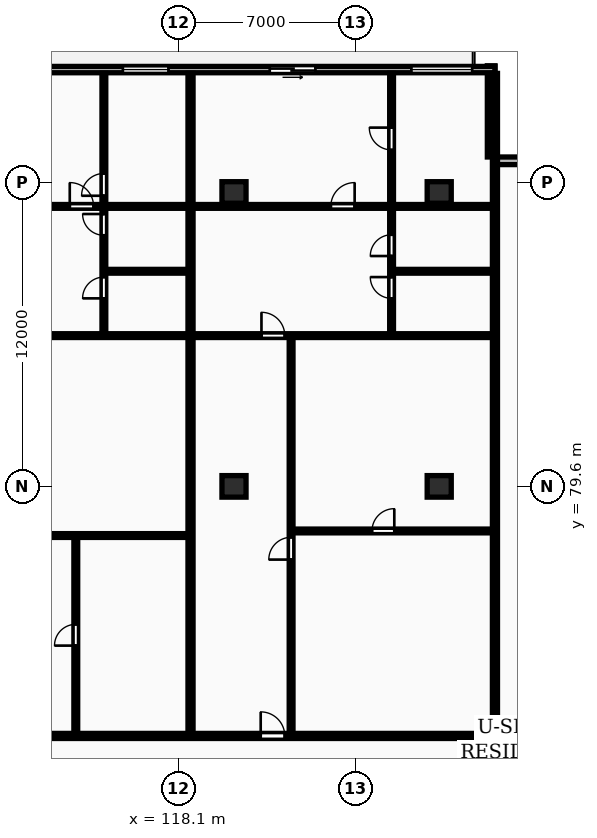
"""IFC4 building model, lengths in metres.
Left out: names, types, materials, properties, quantities, classifications, styles, units other than length and angle.
Written with IfcOpenShell. Run it as: python <this file> out.ifc"""

import sys

from ifc_helpers import new_model, si_unit, direction, frame, frame_2d, origin, origin_2d, place, context, subcontext, project, spatial, rectangle, extrude, element, fill, save


model = new_model("IFC4")
c1 = context("Model", 3, precision=1e-05, world=origin(), true_north=direction((0.0, 1.0)))
c2 = subcontext(c1, "Body", "Model", "MODEL_VIEW")
j1 = project(units=[si_unit("LENGTHUNIT", "METRE"), si_unit("PLANEANGLEUNIT", "RADIAN")], contexts=[c1])
p1 = place(None, origin())
s1 = spatial("IfcSite", under=j1, at=p1, CompositionType="ELEMENT")
p2 = place(p1, origin())
s2 = spatial("IfcBuilding", under=s1, at=p2, CompositionType="ELEMENT")
p3 = place(p2, frame((0.0, 0.0, 113.3)))
s3 = spatial("IfcBuildingStorey", under=s2, at=p3, CompositionType="ELEMENT", Elevation=113.3)
for number, where, z_axis, x_axis in (
    (1, (120.3, 79.6, 0.0), (0.0, 0.0, 1.0), (1.0, 0.0, 0.0)),
    (2, (120.3, 91.2, 0.0), (0.0, 0.0, 1.0), (1.0, 0.0, 0.0)),
    (3, (128.4, 79.6, 0.0), (0.0, 0.0, 1.0), (1.0, 0.0, 0.0)),
    (4, (128.4, 91.2, 0.0), (0.0, 0.0, 1.0), (1.0, 0.0, 0.0)),
):
    element("IfcColumn", number, at=place(p3, frame(where, z_axis=z_axis, x_axis=x_axis)), inside=s3, PredefinedType="COLUMN", context=c2, shape_type="SweptSolid", body=[
        extrude(rectangle(XDim=0.95, YDim=0.85, at=origin_2d()), origin(), (0.0, 0.0, 1.0), 3.25),
    ])
for number, where, z_axis, x_axis in (
    (5, (134.2, 92.45, 0.0), (0.0, 0.0, 1.0), (-1.0, 0.0, 0.0)),
    (6, (130.45, 92.6, 0.0), (0.0, 0.0, 1.0), (0.0, 1.0, 0.0)),
):
    element("IfcWall", number, at=place(p3, frame(where, z_axis=z_axis, x_axis=x_axis)), inside=s3, PredefinedType="STANDARD", context=c2, shape_type="SweptSolid", body=[
        extrude(rectangle(XDim=3.6, YDim=0.3, at=frame_2d((1.8, 0.0))), origin(), (0.0, 0.0, 1.0), 2.97),
    ])
p4 = place(p3, frame((130.6, 96.05, 0.0), z_axis=(0.0, 0.0, 1.0), x_axis=(-1.0, 0.0, 0.0)))
e7 = element("IfcWall", 7, at=p4, inside=s3, PredefinedType="STANDARD", context=c2, shape_type="SweptSolid", body=[
    extrude(rectangle(XDim=73.0, YDim=0.25, at=frame_2d((36.5, 0.0))), origin(), (0.0, 0.0, 1.0), 2.97),
])
p5 = place(p4, frame((68.319, 0.0, 0.0)))
e8 = element("IfcOpeningElement", 8, at=p5, cuts=e7, PredefinedType="OPENING", context=c2, shape_type="SweptSolid", body=[
    extrude(rectangle(XDim=1.8, YDim=2.2, at=frame_2d((0.9, 1.1))), frame((0.0, 0.135, 0.0), z_axis=(0.0, -1.0, 0.0), x_axis=(1.0, 0.0, 0.0)), (0.0, 0.0, 1.0), 0.27),
])
p6 = place(p4, frame((59.277, 0.0, 0.85)))
e9 = element("IfcOpeningElement", 9, at=p6, cuts=e7, PredefinedType="OPENING", context=c2, shape_type="SweptSolid", body=[
    extrude(rectangle(XDim=2.4, YDim=1.9, at=frame_2d((1.2, 0.95))), frame((0.0, 0.135, 0.0), z_axis=(0.0, -1.0, 0.0), x_axis=(1.0, 0.0, 0.0)), (0.0, 0.0, 1.0), 0.27),
])
p7 = place(p4, frame((50.199, 0.0, 0.0)))
e10 = element("IfcOpeningElement", 10, at=p7, cuts=e7, PredefinedType="OPENING", context=c2, shape_type="SweptSolid", body=[
    extrude(rectangle(XDim=1.8, YDim=2.2, at=frame_2d((0.9, 1.1))), frame((0.0, 0.135, 0.0), z_axis=(0.0, -1.0, 0.0), x_axis=(1.0, 0.0, 0.0)), (0.0, 0.0, 1.0), 0.27),
])
p8 = place(p4, frame((40.481, 0.0, 0.85)))
e11 = element("IfcOpeningElement", 11, at=p8, cuts=e7, PredefinedType="OPENING", context=c2, shape_type="SweptSolid", body=[
    extrude(rectangle(XDim=2.4, YDim=1.9, at=frame_2d((1.2, 0.95))), frame((0.0, 0.135, 0.0), z_axis=(0.0, -1.0, 0.0), x_axis=(1.0, 0.0, 0.0)), (0.0, 0.0, 1.0), 0.27),
])
p9 = place(p4, frame((31.93, 0.0, 0.0)))
e12 = element("IfcOpeningElement", 12, at=p9, cuts=e7, PredefinedType="OPENING", context=c2, shape_type="SweptSolid", body=[
    extrude(rectangle(XDim=1.8, YDim=2.2, at=frame_2d((0.9, 1.1))), frame((0.0, 0.135, 0.0), z_axis=(0.0, -1.0, 0.0), x_axis=(1.0, 0.0, 0.0)), (0.0, 0.0, 1.0), 0.27),
])
p10 = place(p4, frame((26.042, 0.0, 0.85)))
e13 = element("IfcOpeningElement", 13, at=p10, cuts=e7, PredefinedType="OPENING", context=c2, shape_type="SweptSolid", body=[
    extrude(rectangle(XDim=2.4, YDim=1.9, at=frame_2d((1.2, 0.95))), frame((0.0, 0.135, 0.0), z_axis=(0.0, -1.0, 0.0), x_axis=(1.0, 0.0, 0.0)), (0.0, 0.0, 1.0), 0.27),
])
p11 = place(p4, frame((19.15, 0.0, 0.0)))
e14 = element("IfcOpeningElement", 14, at=p11, cuts=e7, PredefinedType="OPENING", context=c2, shape_type="SweptSolid", body=[
    extrude(rectangle(XDim=1.8, YDim=2.2, at=frame_2d((0.9, 1.1))), frame((0.0, 0.135, 0.0), z_axis=(0.0, -1.0, 0.0), x_axis=(1.0, 0.0, 0.0)), (0.0, 0.0, 1.0), 0.27),
])
p12 = place(p4, frame((12.886, 0.0, 0.85)))
e15 = element("IfcOpeningElement", 15, at=p12, cuts=e7, PredefinedType="OPENING", context=c2, shape_type="SweptSolid", body=[
    extrude(rectangle(XDim=1.8, YDim=1.8, at=frame_2d((0.9, 0.9))), frame((0.0, 0.135, 0.0), z_axis=(0.0, -1.0, 0.0), x_axis=(1.0, 0.0, 0.0)), (0.0, 0.0, 1.0), 0.27),
])
p13 = place(p4, frame((7.088, 0.0, 0.0)))
e16 = element("IfcOpeningElement", 16, at=p13, cuts=e7, PredefinedType="OPENING", context=c2, shape_type="SweptSolid", body=[
    extrude(rectangle(XDim=1.8, YDim=2.2, at=frame_2d((0.9, 1.1))), frame((0.0, 0.135, 0.0), z_axis=(0.0, -1.0, 0.0), x_axis=(1.0, 0.0, 0.0)), (0.0, 0.0, 1.0), 0.27),
])
p14 = place(p4, frame((0.9, 0.0, 0.85)))
e17 = element("IfcOpeningElement", 17, at=p14, cuts=e7, PredefinedType="OPENING", context=c2, shape_type="SweptSolid", body=[
    extrude(rectangle(XDim=2.4, YDim=1.9, at=frame_2d((1.2, 0.95))), frame((0.0, 0.135, 0.0), z_axis=(0.0, -1.0, 0.0), x_axis=(1.0, 0.0, 0.0)), (0.0, 0.0, 1.0), 0.27),
])
for number, where, z_axis, x_axis in (
    (18, (130.6, 69.83, 0.0), (0.0, 0.0, 1.0), (0.0, 1.0, 0.0)),
    (19, (118.584, 69.83, 0.0), (0.0, 0.0, 1.0), (0.0, 1.0, 0.0)),
):
    element("IfcWall", number, at=place(p3, frame(where, z_axis=z_axis, x_axis=x_axis)), inside=s3, PredefinedType="PARTITIONING", context=c2, shape_type="SweptSolid", body=[
        extrude(rectangle(XDim=26.07, YDim=0.2, at=frame_2d((13.035, 0.0))), origin(), (0.0, 0.0, 1.0), 2.97),
    ])
p15 = place(p3, frame((114.055, 69.81, 0.0), z_axis=(0.0, 0.0, 1.0), x_axis=(0.0, 1.0, 0.0)))
e20 = element("IfcWall", 20, at=p15, inside=s3, PredefinedType="PARTITIONING", context=c2, shape_type="SweptSolid", body=[
    extrude(rectangle(XDim=7.85, YDim=0.15, at=frame_2d((3.925, 0.0))), origin(), (0.0, 0.0, 1.0), 2.97),
])
p16 = place(p15, frame((3.505, 0.0, 0.0)))
e21 = element("IfcOpeningElement", 21, at=p16, cuts=e20, PredefinedType="OPENING", context=c2, shape_type="SweptSolid", body=[
    extrude(rectangle(XDim=0.84, YDim=2.04, at=frame_2d((0.42, 1.02))), frame((0.0, 0.085, 0.0), z_axis=(0.0, -1.0, 0.0), x_axis=(1.0, 0.0, 0.0)), (0.0, 0.0, 1.0), 0.17),
])
p17 = place(p3, frame((109.847, 77.66, 0.0), z_axis=(0.0, 0.0, 1.0), x_axis=(1.0, 0.0, 0.0)))
e22 = element("IfcWall", 22, at=p17, inside=s3, PredefinedType="PARTITIONING", context=c2, shape_type="SweptSolid", body=[
    extrude(rectangle(XDim=8.657, YDim=0.15, at=frame_2d((4.329, 0.0))), origin(), (0.0, 0.0, 1.0), 2.97),
])
p18 = place(p17, frame((0.35, 0.0, 0.0)))
e23 = element("IfcOpeningElement", 23, at=p18, cuts=e22, PredefinedType="OPENING", context=c2, shape_type="SweptSolid", body=[
    extrude(rectangle(XDim=0.88, YDim=2.06, at=frame_2d((0.44, 1.03))), frame((0.0, 0.085, 0.0), z_axis=(0.0, -1.0, 0.0), x_axis=(1.0, 0.0, 0.0)), (0.0, 0.0, 1.0), 0.17),
])
p19 = place(p3, frame((115.224, 88.09, 0.0), z_axis=(0.0, 0.0, 1.0), x_axis=(1.0, 0.0, 0.0)))
e24 = element("IfcWall", 24, at=p19, inside=s3, PredefinedType="PARTITIONING", context=c2, shape_type="SweptSolid", body=[
    extrude(rectangle(XDim=3.28, YDim=0.15, at=frame_2d((1.64, 0.0))), origin(), (0.0, 0.0, 1.0), 2.97),
])
p20 = place(p3, frame((115.164, 85.59, 0.0), z_axis=(0.0, 0.0, 1.0), x_axis=(0.0, 1.0, 0.0)))
e25 = element("IfcWall", 25, at=p20, inside=s3, PredefinedType="PARTITIONING", context=c2, shape_type="SweptSolid", body=[
    extrude(rectangle(XDim=10.31, YDim=0.15, at=frame_2d((5.155, 0.0))), origin(), (0.0, 0.0, 1.0), 2.97),
])
p21 = place(p20, frame((1.43, 0.0, 0.0)))
e26 = element("IfcOpeningElement", 26, at=p21, cuts=e25, PredefinedType="OPENING", context=c2, shape_type="SweptSolid", body=[
    extrude(rectangle(XDim=0.84, YDim=2.04, at=frame_2d((0.42, 1.02))), frame((0.0, 0.085, 0.0), z_axis=(0.0, -1.0, 0.0), x_axis=(1.0, 0.0, 0.0)), (0.0, 0.0, 1.0), 0.17),
])
p22 = place(p20, frame((3.92, 0.0, 0.0)))
e27 = element("IfcOpeningElement", 27, at=p22, cuts=e25, PredefinedType="OPENING", context=c2, shape_type="SweptSolid", body=[
    extrude(rectangle(XDim=0.84, YDim=2.04, at=frame_2d((0.42, 1.02))), frame((0.0, 0.085, 0.0), z_axis=(0.0, -1.0, 0.0), x_axis=(1.0, 0.0, 0.0)), (0.0, 0.0, 1.0), 0.17),
])
p23 = place(p20, frame((5.48, 0.0, 0.0)))
e28 = element("IfcOpeningElement", 28, at=p23, cuts=e25, PredefinedType="OPENING", context=c2, shape_type="SweptSolid", body=[
    extrude(rectangle(XDim=0.88, YDim=2.06, at=frame_2d((0.44, 1.03))), frame((0.0, 0.085, 0.0), z_axis=(0.0, -1.0, 0.0), x_axis=(1.0, 0.0, 0.0)), (0.0, 0.0, 1.0), 0.17),
])
p24 = place(p3, frame((105.896, 85.55, 0.0), z_axis=(0.0, 0.0, 1.0), x_axis=(1.0, 0.0, 0.0)))
e29 = element("IfcWall", 29, at=p24, inside=s3, PredefinedType="PARTITIONING", context=c2, shape_type="SweptSolid", body=[
    extrude(rectangle(XDim=12.607, YDim=0.15, at=frame_2d((6.304, 0.0))), origin(), (0.0, 0.0, 1.0), 2.97),
])
p25 = place(p24, frame((2.72, 0.0, 0.0)))
e30 = element("IfcOpeningElement", 30, at=p25, cuts=e29, PredefinedType="OPENING", context=c2, shape_type="SweptSolid", body=[
    extrude(rectangle(XDim=0.92, YDim=2.08, at=frame_2d((0.46, 1.04))), frame((0.0, 0.085, 0.0), z_axis=(0.0, -1.0, 0.0), x_axis=(1.0, 0.0, 0.0)), (0.0, 0.0, 1.0), 0.17),
])
p26 = place(p3, frame((105.896, 90.65, 0.0), z_axis=(0.0, 0.0, 1.0), x_axis=(1.0, 0.0, 0.0)))
e31 = element("IfcWall", 31, at=p26, inside=s3, PredefinedType="PARTITIONING", context=c2, shape_type="SweptSolid", body=[
    extrude(rectangle(XDim=12.607, YDim=0.15, at=frame_2d((6.304, 0.0))), origin(), (0.0, 0.0, 1.0), 2.97),
])
p27 = place(p26, frame((7.921, 0.0, 0.0)))
e32 = element("IfcOpeningElement", 32, at=p27, cuts=e31, PredefinedType="OPENING", context=c2, shape_type="SweptSolid", body=[
    extrude(rectangle(XDim=0.94, YDim=2.1, at=frame_2d((0.47, 1.05))), frame((0.0, 0.085, 0.0), z_axis=(0.0, -1.0, 0.0), x_axis=(1.0, 0.0, 0.0)), (0.0, 0.0, 1.0), 0.17),
])
p28 = place(p3, frame((122.614, 77.84, 0.0), z_axis=(0.0, 0.0, 1.0), x_axis=(1.0, 0.0, 0.0)))
e33 = element("IfcWall", 33, at=p28, inside=s3, PredefinedType="PARTITIONING", context=c2, shape_type="SweptSolid", body=[
    extrude(rectangle(XDim=7.906, YDim=0.15, at=frame_2d((3.953, 0.0))), origin(), (0.0, 0.0, 1.0), 2.97),
])
p29 = place(p28, frame((3.134, 0.0, 0.0)))
e34 = element("IfcOpeningElement", 34, at=p29, cuts=e33, PredefinedType="OPENING", context=c2, shape_type="SweptSolid", body=[
    extrude(rectangle(XDim=0.88, YDim=2.06, at=frame_2d((0.44, 1.03))), frame((0.0, 0.085, 0.0), z_axis=(0.0, -1.0, 0.0), x_axis=(1.0, 0.0, 0.0)), (0.0, 0.0, 1.0), 0.17),
])
p30 = place(p3, frame((122.554, 69.81, 0.0), z_axis=(0.0, 0.0, 1.0), x_axis=(0.0, 1.0, 0.0)))
e35 = element("IfcWall", 35, at=p30, inside=s3, PredefinedType="PARTITIONING", context=c2, shape_type="SweptSolid", body=[
    extrude(rectangle(XDim=15.7, YDim=0.15, at=frame_2d((7.85, 0.0))), origin(), (0.0, 0.0, 1.0), 2.97),
])
p31 = place(p30, frame((6.9, 0.0, 0.0)))
e36 = element("IfcOpeningElement", 36, at=p31, cuts=e35, PredefinedType="OPENING", context=c2, shape_type="SweptSolid", body=[
    extrude(rectangle(XDim=0.88, YDim=2.06, at=frame_2d((0.44, 1.03))), frame((0.0, 0.085, 0.0), z_axis=(0.0, -1.0, 0.0), x_axis=(1.0, 0.0, 0.0)), (0.0, 0.0, 1.0), 0.17),
])
p32 = place(p3, frame((126.58, 88.09, 0.0), z_axis=(0.0, 0.0, 1.0), x_axis=(1.0, 0.0, 0.0)))
e37 = element("IfcWall", 37, at=p32, inside=s3, PredefinedType="PARTITIONING", context=c2, shape_type="SweptSolid", body=[
    extrude(rectangle(XDim=3.94, YDim=0.15, at=frame_2d((1.97, 0.0))), origin(), (0.0, 0.0, 1.0), 2.97),
])
p33 = place(p3, frame((126.52, 85.59, 0.0), z_axis=(0.0, 0.0, 1.0), x_axis=(0.0, 1.0, 0.0)))
e38 = element("IfcWall", 38, at=p33, inside=s3, PredefinedType="PARTITIONING", context=c2, shape_type="SweptSolid", body=[
    extrude(rectangle(XDim=10.31, YDim=0.15, at=frame_2d((5.155, 0.0))), origin(), (0.0, 0.0, 1.0), 2.97),
])
p34 = place(p33, frame((1.43, 0.0, 0.0)))
e39 = element("IfcOpeningElement", 39, at=p34, cuts=e38, PredefinedType="OPENING", context=c2, shape_type="SweptSolid", body=[
    extrude(rectangle(XDim=0.84, YDim=2.04, at=frame_2d((0.42, 1.02))), frame((0.0, 0.085, 0.0), z_axis=(0.0, -1.0, 0.0), x_axis=(1.0, 0.0, 0.0)), (0.0, 0.0, 1.0), 0.17),
])
p35 = place(p33, frame((3.102, 0.0, 0.0)))
e40 = element("IfcOpeningElement", 40, at=p35, cuts=e38, PredefinedType="OPENING", context=c2, shape_type="SweptSolid", body=[
    extrude(rectangle(XDim=0.84, YDim=2.04, at=frame_2d((0.42, 1.02))), frame((0.0, 0.085, 0.0), z_axis=(0.0, -1.0, 0.0), x_axis=(1.0, 0.0, 0.0)), (0.0, 0.0, 1.0), 0.17),
])
p36 = place(p33, frame((7.29, 0.0, 0.0)))
e41 = element("IfcOpeningElement", 41, at=p36, cuts=e38, PredefinedType="OPENING", context=c2, shape_type="SweptSolid", body=[
    extrude(rectangle(XDim=0.88, YDim=2.06, at=frame_2d((0.44, 1.03))), frame((0.0, 0.085, 0.0), z_axis=(0.0, -1.0, 0.0), x_axis=(1.0, 0.0, 0.0)), (0.0, 0.0, 1.0), 0.17),
])
p37 = place(p3, frame((118.664, 85.55, 0.0), z_axis=(0.0, 0.0, 1.0), x_axis=(1.0, 0.0, 0.0)))
e42 = element("IfcWall", 42, at=p37, inside=s3, PredefinedType="PARTITIONING", context=c2, shape_type="SweptSolid", body=[
    extrude(rectangle(XDim=11.856, YDim=0.15, at=frame_2d((5.928, 0.0))), origin(), (0.0, 0.0, 1.0), 2.97),
])
p38 = place(p37, frame((2.72, 0.0, 0.0)))
e43 = element("IfcOpeningElement", 43, at=p38, cuts=e42, PredefinedType="OPENING", context=c2, shape_type="SweptSolid", body=[
    extrude(rectangle(XDim=0.92, YDim=2.08, at=frame_2d((0.46, 1.04))), frame((0.0, 0.085, 0.0), z_axis=(0.0, -1.0, 0.0), x_axis=(1.0, 0.0, 0.0)), (0.0, 0.0, 1.0), 0.17),
])
p39 = place(p3, frame((118.664, 90.65, 0.0), z_axis=(0.0, 0.0, 1.0), x_axis=(1.0, 0.0, 0.0)))
e44 = element("IfcWall", 44, at=p39, inside=s3, PredefinedType="PARTITIONING", context=c2, shape_type="SweptSolid", body=[
    extrude(rectangle(XDim=11.856, YDim=0.15, at=frame_2d((5.928, 0.0))), origin(), (0.0, 0.0, 1.0), 2.97),
])
p40 = place(p39, frame((5.458, 0.0, 0.0)))
e45 = element("IfcOpeningElement", 45, at=p40, cuts=e44, PredefinedType="OPENING", context=c2, shape_type="SweptSolid", body=[
    extrude(rectangle(XDim=0.94, YDim=2.1, at=frame_2d((0.47, 1.05))), frame((0.0, 0.085, 0.0), z_axis=(0.0, -1.0, 0.0), x_axis=(1.0, 0.0, 0.0)), (0.0, 0.0, 1.0), 0.17),
])
p41 = place(p3, frame((57.6, 69.75, 0.0), z_axis=(0.0, 0.0, 1.0), x_axis=(1.0, 0.0, 0.0)))
e46 = element("IfcWall", 46, at=p41, inside=s3, PredefinedType="PARTITIONING", context=c2, shape_type="SweptSolid", body=[
    extrude(rectangle(XDim=73.0, YDim=0.2, at=frame_2d((36.5, 0.0))), origin(), (0.0, 0.0, 1.0), 2.97),
])
p42 = place(p41, frame((7.172, 0.0, 0.0)))
e47 = element("IfcOpeningElement", 47, at=p42, cuts=e46, PredefinedType="OPENING", context=c2, shape_type="SweptSolid", body=[
    extrude(rectangle(XDim=1.22, YDim=2.18, at=frame_2d((0.61, 1.09))), frame((0.0, 0.11, 0.0), z_axis=(0.0, -1.0, 0.0), x_axis=(1.0, 0.0, 0.0)), (0.0, 0.0, 1.0), 0.22),
])
p43 = place(p41, frame((23.96, 0.0, 0.0)))
e48 = element("IfcOpeningElement", 48, at=p43, cuts=e46, PredefinedType="OPENING", context=c2, shape_type="SweptSolid", body=[
    extrude(rectangle(XDim=1.22, YDim=2.18, at=frame_2d((0.61, 1.09))), frame((0.0, 0.11, 0.0), z_axis=(0.0, -1.0, 0.0), x_axis=(1.0, 0.0, 0.0)), (0.0, 0.0, 1.0), 0.22),
])
p44 = place(p41, frame((38.846, 0.0, 0.0)))
e49 = element("IfcOpeningElement", 49, at=p44, cuts=e46, PredefinedType="OPENING", context=c2, shape_type="SweptSolid", body=[
    extrude(rectangle(XDim=0.95, YDim=2.15, at=frame_2d((0.475, 1.075))), frame((0.0, 0.11, 0.0), z_axis=(0.0, -1.0, 0.0), x_axis=(1.0, 0.0, 0.0)), (0.0, 0.0, 1.0), 0.22),
])
p45 = place(p41, frame((50.262, 0.0, 0.0)))
e50 = element("IfcOpeningElement", 50, at=p45, cuts=e46, PredefinedType="OPENING", context=c2, shape_type="SweptSolid", body=[
    extrude(rectangle(XDim=0.95, YDim=2.15, at=frame_2d((0.475, 1.075))), frame((0.0, 0.11, 0.0), z_axis=(0.0, -1.0, 0.0), x_axis=(1.0, 0.0, 0.0)), (0.0, 0.0, 1.0), 0.22),
])
p46 = place(p41, frame((63.754, 0.0, 0.0)))
e51 = element("IfcOpeningElement", 51, at=p46, cuts=e46, PredefinedType="OPENING", context=c2, shape_type="SweptSolid", body=[
    extrude(rectangle(XDim=0.95, YDim=2.15, at=frame_2d((0.475, 1.075))), frame((0.0, 0.11, 0.0), z_axis=(0.0, -1.0, 0.0), x_axis=(1.0, 0.0, 0.0)), (0.0, 0.0, 1.0), 0.22),
])
p47 = place(p12, origin())
e52 = element("IfcWindow", 52, at=p47, inside=s3, PartitioningType="SINGLE_PANEL", PredefinedType="WINDOW", context=c2, shape_type="SweptSolid", body=[
    extrude(rectangle(XDim=1.8, YDim=1.8, at=frame_2d((0.9, 0.9))), frame((0.0, 0.03, 0.0), z_axis=(0.0, -1.0, 0.0), x_axis=(1.0, 0.0, 0.0)), (0.0, 0.0, 1.0), 0.06),
])
fill(e15, e52)
p48 = place(p13, origin())
e53 = element("IfcDoor", 53, at=p48, inside=s3, OperationType="SLIDING_TO_LEFT", PredefinedType="DOOR", context=c2, shape_type="SweptSolid", body=[
    extrude(rectangle(XDim=1.8, YDim=2.2, at=frame_2d((0.9, 1.1))), frame((0.0, 0.025, 0.0), z_axis=(0.0, -1.0, 0.0), x_axis=(1.0, 0.0, 0.0)), (0.0, 0.0, 1.0), 0.05),
])
fill(e16, e53)
p49 = place(p14, origin())
e54 = element("IfcWindow", 54, at=p49, inside=s3, PartitioningType="DOUBLE_PANEL_VERTICAL", PredefinedType="WINDOW", context=c2, shape_type="SweptSolid", body=[
    extrude(rectangle(XDim=2.4, YDim=1.9, at=frame_2d((1.2, 0.95))), frame((0.0, 0.03, 0.0), z_axis=(0.0, -1.0, 0.0), x_axis=(1.0, 0.0, 0.0)), (0.0, 0.0, 1.0), 0.06),
])
fill(e17, e54)
p50 = place(p16, origin())
e55 = element("IfcDoor", 55, at=p50, inside=s3, OperationType="SINGLE_SWING_LEFT", PredefinedType="DOOR", context=c2, shape_type="SweptSolid", body=[
    extrude(rectangle(XDim=0.84, YDim=2.04, at=frame_2d((0.42, 1.02))), frame((0.0, 0.025, 0.0), z_axis=(0.0, -1.0, 0.0), x_axis=(1.0, 0.0, 0.0)), (0.0, 0.0, 1.0), 0.05),
])
fill(e21, e55)
p51 = place(p21, origin())
e56 = element("IfcDoor", 56, at=p51, inside=s3, OperationType="SINGLE_SWING_LEFT", PredefinedType="DOOR", context=c2, shape_type="SweptSolid", body=[
    extrude(rectangle(XDim=0.84, YDim=2.04, at=frame_2d((0.42, 1.02))), frame((0.0, 0.025, 0.0), z_axis=(0.0, -1.0, 0.0), x_axis=(1.0, 0.0, 0.0)), (0.0, 0.0, 1.0), 0.05),
])
fill(e26, e56)
p52 = place(p22, origin())
e57 = element("IfcDoor", 57, at=p52, inside=s3, OperationType="SINGLE_SWING_RIGHT", PredefinedType="DOOR", context=c2, shape_type="SweptSolid", body=[
    extrude(rectangle(XDim=0.84, YDim=2.04, at=frame_2d((0.42, 1.02))), frame((0.0, 0.025, 0.0), z_axis=(0.0, -1.0, 0.0), x_axis=(1.0, 0.0, 0.0)), (0.0, 0.0, 1.0), 0.05),
])
fill(e27, e57)
p53 = place(p23, origin())
e58 = element("IfcDoor", 58, at=p53, inside=s3, OperationType="SINGLE_SWING_LEFT", PredefinedType="DOOR", context=c2, shape_type="SweptSolid", body=[
    extrude(rectangle(XDim=0.88, YDim=2.06, at=frame_2d((0.44, 1.03))), frame((0.0, 0.025, 0.0), z_axis=(0.0, -1.0, 0.0), x_axis=(1.0, 0.0, 0.0)), (0.0, 0.0, 1.0), 0.05),
])
fill(e28, e58)
p54 = place(p27, origin())
e59 = element("IfcDoor", 59, at=p54, inside=s3, OperationType="SINGLE_SWING_LEFT", PredefinedType="DOOR", context=c2, shape_type="SweptSolid", body=[
    extrude(rectangle(XDim=0.94, YDim=2.1, at=frame_2d((0.47, 1.05))), frame((0.0, 0.025, 0.0), z_axis=(0.0, -1.0, 0.0), x_axis=(1.0, 0.0, 0.0)), (0.0, 0.0, 1.0), 0.05),
])
fill(e32, e59)
p55 = place(p29, origin())
e60 = element("IfcDoor", 60, at=p55, inside=s3, OperationType="SINGLE_SWING_RIGHT", PredefinedType="DOOR", context=c2, shape_type="SweptSolid", body=[
    extrude(rectangle(XDim=0.88, YDim=2.06, at=frame_2d((0.44, 1.03))), frame((0.0, 0.025, 0.0), z_axis=(0.0, -1.0, 0.0), x_axis=(1.0, 0.0, 0.0)), (0.0, 0.0, 1.0), 0.05),
])
fill(e34, e60)
p56 = place(p31, origin())
e61 = element("IfcDoor", 61, at=p56, inside=s3, OperationType="SINGLE_SWING_LEFT", PredefinedType="DOOR", context=c2, shape_type="SweptSolid", body=[
    extrude(rectangle(XDim=0.88, YDim=2.06, at=frame_2d((0.44, 1.03))), frame((0.0, 0.025, 0.0), z_axis=(0.0, -1.0, 0.0), x_axis=(1.0, 0.0, 0.0)), (0.0, 0.0, 1.0), 0.05),
])
fill(e36, e61)
p57 = place(p34, origin())
e62 = element("IfcDoor", 62, at=p57, inside=s3, OperationType="SINGLE_SWING_RIGHT", PredefinedType="DOOR", context=c2, shape_type="SweptSolid", body=[
    extrude(rectangle(XDim=0.84, YDim=2.04, at=frame_2d((0.42, 1.02))), frame((0.0, 0.025, 0.0), z_axis=(0.0, -1.0, 0.0), x_axis=(1.0, 0.0, 0.0)), (0.0, 0.0, 1.0), 0.05),
])
fill(e39, e62)
p58 = place(p35, origin())
e63 = element("IfcDoor", 63, at=p58, inside=s3, OperationType="SINGLE_SWING_LEFT", PredefinedType="DOOR", context=c2, shape_type="SweptSolid", body=[
    extrude(rectangle(XDim=0.84, YDim=2.04, at=frame_2d((0.42, 1.02))), frame((0.0, 0.025, 0.0), z_axis=(0.0, -1.0, 0.0), x_axis=(1.0, 0.0, 0.0)), (0.0, 0.0, 1.0), 0.05),
])
fill(e40, e63)
p59 = place(p36, origin())
e64 = element("IfcDoor", 64, at=p59, inside=s3, OperationType="SINGLE_SWING_RIGHT", PredefinedType="DOOR", context=c2, shape_type="SweptSolid", body=[
    extrude(rectangle(XDim=0.88, YDim=2.06, at=frame_2d((0.44, 1.03))), frame((0.0, 0.025, 0.0), z_axis=(0.0, -1.0, 0.0), x_axis=(1.0, 0.0, 0.0)), (0.0, 0.0, 1.0), 0.05),
])
fill(e41, e64)
p60 = place(p38, origin())
e65 = element("IfcDoor", 65, at=p60, inside=s3, OperationType="SINGLE_SWING_LEFT", PredefinedType="DOOR", context=c2, shape_type="SweptSolid", body=[
    extrude(rectangle(XDim=0.92, YDim=2.08, at=frame_2d((0.46, 1.04))), frame((0.0, 0.025, 0.0), z_axis=(0.0, -1.0, 0.0), x_axis=(1.0, 0.0, 0.0)), (0.0, 0.0, 1.0), 0.05),
])
fill(e43, e65)
p61 = place(p40, origin())
e66 = element("IfcDoor", 66, at=p61, inside=s3, OperationType="SINGLE_SWING_RIGHT", PredefinedType="DOOR", context=c2, shape_type="SweptSolid", body=[
    extrude(rectangle(XDim=0.94, YDim=2.1, at=frame_2d((0.47, 1.05))), frame((0.0, 0.025, 0.0), z_axis=(0.0, -1.0, 0.0), x_axis=(1.0, 0.0, 0.0)), (0.0, 0.0, 1.0), 0.05),
])
fill(e45, e66)
p62 = place(p46, origin())
e67 = element("IfcDoor", 67, at=p62, inside=s3, OperationType="SINGLE_SWING_LEFT", PredefinedType="DOOR", context=c2, shape_type="SweptSolid", body=[
    extrude(rectangle(XDim=0.95, YDim=2.15, at=frame_2d((0.475, 1.075))), frame((0.0, 0.025, 0.0), z_axis=(0.0, -1.0, 0.0), x_axis=(1.0, 0.0, 0.0)), (0.0, 0.0, 1.0), 0.05),
])
fill(e51, e67)
save(model, sys.argv[1])
